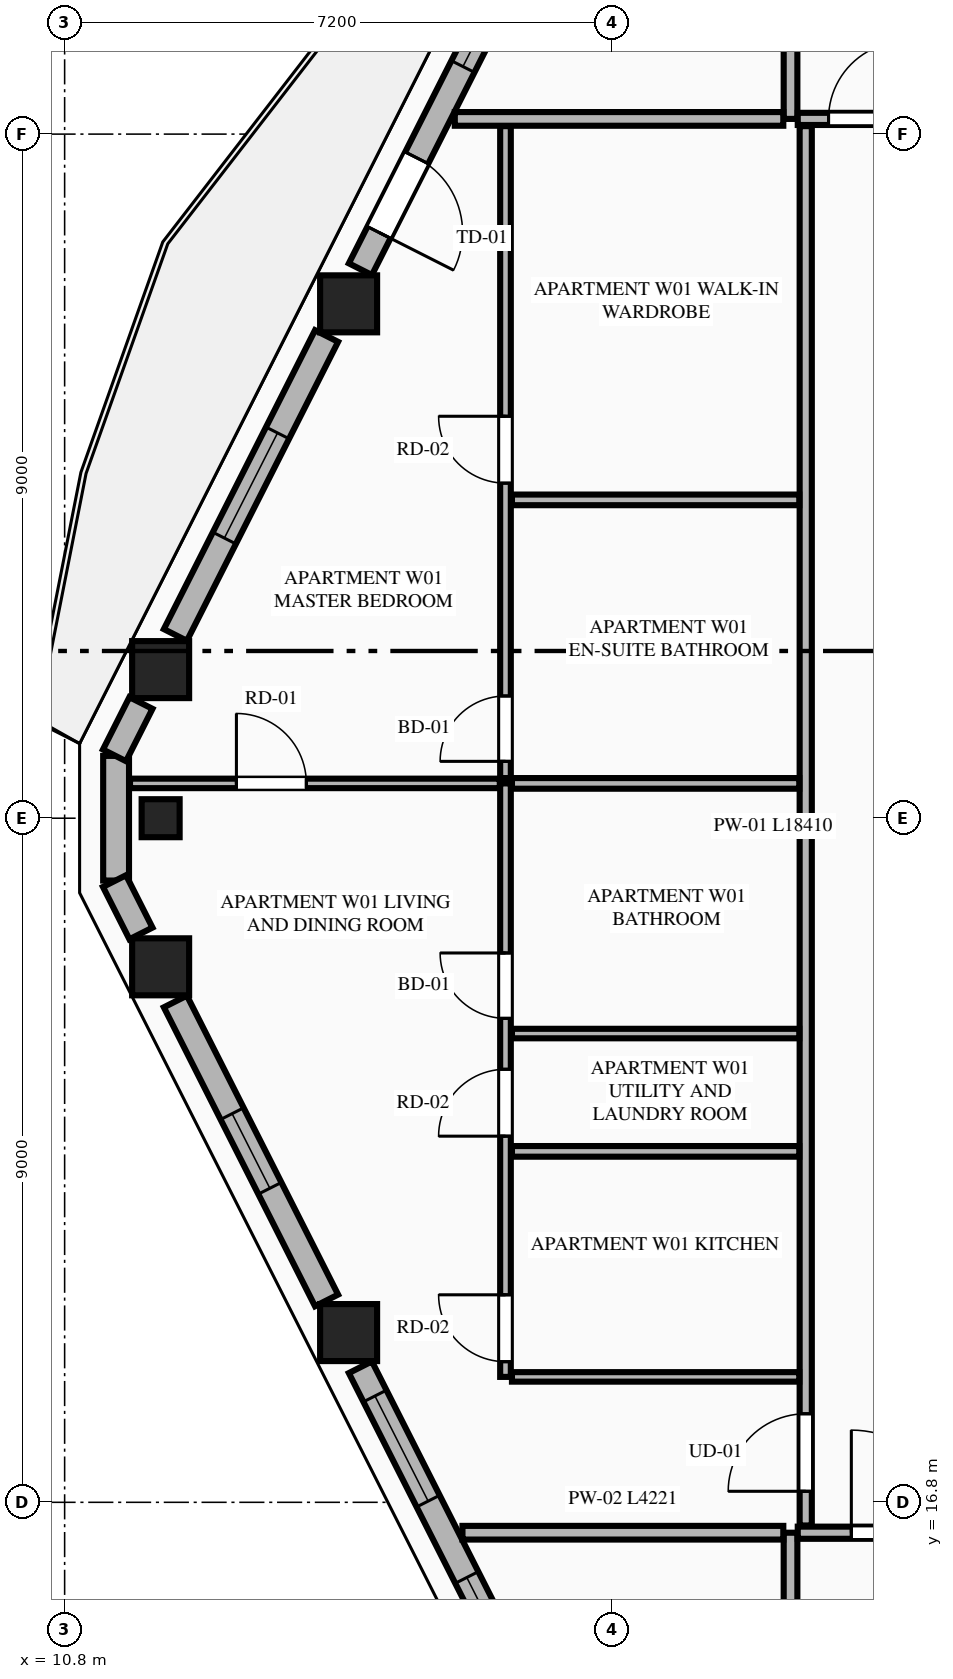
"""IFC4 building model, lengths in metres.
Left out: names, types, materials, properties, quantities, classifications, styles, units other than length and angle.
Written with IfcOpenShell. Run it as: python <this file> out.ifc"""

import sys

from ifc_helpers import new_model, si_unit, direction, frame, frame_2d, origin, origin_2d, place, context, subcontext, project, spatial, rectangle, extrude, element, fill, save


model = new_model("IFC4")
c1 = context("Model", 3, precision=1e-05, world=origin(), true_north=direction((0.0, 1.0)))
c2 = subcontext(c1, "Body", "Model", "MODEL_VIEW")
j1 = project(units=[si_unit("LENGTHUNIT", "METRE"), si_unit("PLANEANGLEUNIT", "RADIAN")], contexts=[c1])
p1 = place(None, origin())
s1 = spatial("IfcSite", under=j1, at=p1, CompositionType="ELEMENT")
p2 = place(p1, origin())
s2 = spatial("IfcBuilding", under=s1, at=p2, CompositionType="ELEMENT")
p3 = place(p2, frame((0.0, 0.0, 248.9)))
s3 = spatial("IfcBuildingStorey", under=s2, at=p3, CompositionType="ELEMENT", Elevation=248.9)
for number, where, z_axis, x_axis in (
    (1, (14.536, 32.567, 0.0), (0.0, 0.0, 1.0), (1.0, 0.0, 0.0)),
    (2, (12.063, 27.755, 0.0), (0.0, 0.0, 1.0), (1.0, 0.0, 0.0)),
    (3, (12.063, 23.845, 0.0), (0.0, 0.0, 1.0), (1.0, 0.0, 0.0)),
    (4, (14.536, 19.033, 0.0), (0.0, 0.0, 1.0), (1.0, 0.0, 0.0)),
):
    element("IfcColumn", number, at=place(p3, frame(where, z_axis=z_axis, x_axis=x_axis)), inside=s3, PredefinedType="COLUMN", context=c2, shape_type="SweptSolid", body=[
        extrude(rectangle(XDim=0.75, YDim=0.75, at=origin_2d()), origin(), (0.0, 0.0, 1.0), 3.65),
    ])
p4 = place(p3, frame((12.063, 25.8, 0.0), z_axis=(0.0, 0.0, 1.0), x_axis=(0.0, -1.0, 0.0)))
e5 = element("IfcColumn", 5, at=p4, inside=s3, PredefinedType="PILASTER", context=c2, shape_type="SweptSolid", body=[
    extrude(rectangle(XDim=0.5, YDim=0.35, at=origin_2d()), origin(), (0.0, 0.0, 1.0), 3.65),
])
p5 = place(p3, frame((11.477, 26.62, 0.0), z_axis=(0.0, 0.0, 1.0), x_axis=(0.0, -1.0, 0.0)))
e6 = element("IfcWall", 6, at=p5, inside=s3, PredefinedType="STANDARD", context=c2, shape_type="SweptSolid", body=[
    extrude(rectangle(XDim=1.64, YDim=0.34, at=frame_2d((0.82, 0.0))), origin(), (0.0, 0.0, 1.0), 3.45),
])
p6 = place(p3, frame((16.768, 37.127, 0.0), z_axis=(0.0, 0.0, 1.0), x_axis=(-0.451581819983, -0.892229712496, 0.0)))
e7 = element("IfcWall", 7, at=p6, inside=s3, PredefinedType="STANDARD", context=c2, shape_type="SweptSolid", body=[
    extrude(rectangle(XDim=4.6, YDim=0.34, at=frame_2d((2.3, 0.0))), origin(), (0.0, 0.0, 1.0), 2.983),
])
p7 = place(p6, frame((2.958, 0.0, 0.0)))
e8 = element("IfcOpeningElement", 8, at=p7, cuts=e7, PredefinedType="OPENING", context=c2, shape_type="SweptSolid", body=[
    extrude(rectangle(XDim=1.1, YDim=2.25, at=frame_2d((0.55, 1.125))), frame((0.0, 0.18, 0.0), z_axis=(0.0, -1.0, 0.0), x_axis=(1.0, 0.0, 0.0)), (0.0, 0.0, 1.0), 0.36),
])
p8 = place(p6, frame((0.512, 0.0, 0.75)))
e9 = element("IfcOpeningElement", 9, at=p8, cuts=e7, PredefinedType="OPENING", context=c2, shape_type="SweptSolid", body=[
    extrude(rectangle(XDim=1.1, YDim=2.0, at=frame_2d((0.55, 1.0))), frame((0.0, 0.18, 0.0), z_axis=(0.0, -1.0, 0.0), x_axis=(1.0, 0.0, 0.0)), (0.0, 0.0, 1.0), 0.36),
])
p9 = place(p3, frame((14.246, 32.144, 0.0), z_axis=(0.0, 0.0, 1.0), x_axis=(-0.451285866323, -0.892379441077, 0.0)))
e10 = element("IfcWall", 10, at=p9, inside=s3, PredefinedType="STANDARD", context=c2, shape_type="SweptSolid", body=[
    extrude(rectangle(XDim=4.407, YDim=0.34, at=frame_2d((2.204, 0.0))), origin(), (0.0, 0.0, 1.0), 2.983),
])
p10 = place(p9, frame((1.429, 0.0, 0.75)))
e11 = element("IfcOpeningElement", 11, at=p10, cuts=e10, PredefinedType="OPENING", context=c2, shape_type="SweptSolid", body=[
    extrude(rectangle(XDim=1.55, YDim=2.05, at=frame_2d((0.775, 1.025))), frame((0.0, 0.18, 0.0), z_axis=(0.0, -1.0, 0.0), x_axis=(1.0, 0.0, 0.0)), (0.0, 0.0, 1.0), 0.36),
])
for number, where, z_axis, x_axis in (
    (12, (11.804, 27.316, 0.0), (0.0, 0.0, 1.0), (-0.451, -0.893, 0.0)),
    (13, (11.456, 24.973, 0.0), (0.0, 0.0, 1.0), (0.451, -0.893, 0.0)),
):
    element("IfcWall", number, at=place(p3, frame(where, z_axis=z_axis, x_axis=x_axis)), inside=s3, PredefinedType="STANDARD", context=c2, shape_type="SweptSolid", body=[
        extrude(rectangle(XDim=0.772, YDim=0.34, at=frame_2d((0.386, 0.0))), origin(), (0.0, 0.0, 1.0), 3.45),
    ])
p11 = place(p3, frame((12.257, 23.389, 0.0), z_axis=(0.0, 0.0, 1.0), x_axis=(0.45130817501, -0.892368158984, 0.0)))
e14 = element("IfcWall", 14, at=p11, inside=s3, PredefinedType="STANDARD", context=c2, shape_type="SweptSolid", body=[
    extrude(rectangle(XDim=4.407, YDim=0.34, at=frame_2d((2.204, 0.0))), origin(), (0.0, 0.0, 1.0), 2.983),
])
p12 = place(p11, frame((1.654, 0.0, 0.75)))
e15 = element("IfcOpeningElement", 15, at=p12, cuts=e14, PredefinedType="OPENING", context=c2, shape_type="SweptSolid", body=[
    extrude(rectangle(XDim=1.1, YDim=2.0, at=frame_2d((0.55, 1.0))), frame((0.0, 0.18, 0.0), z_axis=(0.0, -1.0, 0.0), x_axis=(1.0, 0.0, 0.0)), (0.0, 0.0, 1.0), 0.36),
])
p13 = place(p3, frame((14.691, 18.577, 0.0), z_axis=(0.0, 0.0, 1.0), x_axis=(0.451581819983, -0.892229712496, 0.0)))
e16 = element("IfcWall", 16, at=p13, inside=s3, PredefinedType="STANDARD", context=c2, shape_type="SweptSolid", body=[
    extrude(rectangle(XDim=4.6, YDim=0.34, at=frame_2d((2.3, 0.0))), origin(), (0.0, 0.0, 1.0), 2.983),
])
p14 = place(p13, frame((0.424, 0.0, 0.75)))
e17 = element("IfcOpeningElement", 17, at=p14, cuts=e16, PredefinedType="OPENING", context=c2, shape_type="SweptSolid", body=[
    extrude(rectangle(XDim=1.55, YDim=2.05, at=frame_2d((0.775, 1.025))), frame((0.0, 0.18, 0.0), z_axis=(0.0, -1.0, 0.0), x_axis=(1.0, 0.0, 0.0)), (0.0, 0.0, 1.0), 0.36),
])
p15 = place(p13, frame((3.1, 0.0, 0.75)))
e18 = element("IfcOpeningElement", 18, at=p15, cuts=e16, PredefinedType="OPENING", context=c2, shape_type="SweptSolid", body=[
    extrude(rectangle(XDim=1.1, YDim=2.0, at=frame_2d((0.55, 1.0))), frame((0.0, 0.18, 0.0), z_axis=(0.0, -1.0, 0.0), x_axis=(1.0, 0.0, 0.0)), (0.0, 0.0, 1.0), 0.36),
])
p16 = place(p3, frame((20.35, 8.119, 0.0), z_axis=(0.0, 0.0, 1.0), x_axis=(0.0, 1.0, 0.0)))
e19 = element("IfcWall", 19, at=p16, inside=s3, PredefinedType="PARTITIONING", context=c2, shape_type="SweptSolid", body=[
    extrude(rectangle(XDim=8.281, YDim=0.18, at=frame_2d((4.141, 0.0))), origin(), (0.0, 0.0, 1.0), 3.45),
])
p17 = place(p3, frame((20.445, 16.4, 0.0), z_axis=(0.0, 0.0, 1.0), x_axis=(1.0, 0.0, 0.0)))
e20 = element("IfcWall", 20, at=p17, inside=s3, PredefinedType="PARTITIONING", context=c2, shape_type="SweptSolid", body=[
    extrude(rectangle(XDim=23.91, YDim=0.16, at=frame_2d((11.955, 0.0))), origin(), (0.0, 0.0, 1.0), 3.45),
])
p18 = place(p17, frame((0.705, 0.0, 0.0)))
e21 = element("IfcOpeningElement", 21, at=p18, cuts=e20, PredefinedType="OPENING", context=c2, shape_type="SweptSolid", body=[
    extrude(rectangle(XDim=1.35, YDim=2.35, at=frame_2d((0.675, 1.175))), frame((0.0, 0.09, 0.0), z_axis=(0.0, -1.0, 0.0), x_axis=(1.0, 0.0, 0.0)), (0.0, 0.0, 1.0), 0.18),
])
p19 = place(p3, frame((20.35, 35.0, 0.0), z_axis=(0.0, 0.0, 1.0), x_axis=(0.0, 1.0, 0.0)))
e22 = element("IfcWall", 22, at=p19, inside=s3, PredefinedType="PARTITIONING", context=c2, shape_type="SweptSolid", body=[
    extrude(rectangle(XDim=8.481, YDim=0.18, at=frame_2d((4.24, 0.0))), origin(), (0.0, 0.0, 1.0), 3.45),
])
p20 = place(p3, frame((20.445, 35.0, 0.0), z_axis=(0.0, 0.0, 1.0), x_axis=(1.0, 0.0, 0.0)))
e23 = element("IfcWall", 23, at=p20, inside=s3, PredefinedType="PARTITIONING", context=c2, shape_type="SweptSolid", body=[
    extrude(rectangle(XDim=8.606, YDim=0.16, at=frame_2d((4.303, 0.0))), origin(), (0.0, 0.0, 1.0), 3.45),
])
p21 = place(p20, frame((0.405, 0.0, 0.0)))
e24 = element("IfcOpeningElement", 24, at=p21, cuts=e23, PredefinedType="OPENING", context=c2, shape_type="SweptSolid", body=[
    extrude(rectangle(XDim=1.02, YDim=2.25, at=frame_2d((0.51, 1.125))), frame((0.0, 0.09, 0.0), z_axis=(0.0, -1.0, 0.0), x_axis=(1.0, 0.0, 0.0)), (0.0, 0.0, 1.0), 0.18),
])
p22 = place(p3, frame((16.034, 16.4, 0.0), z_axis=(0.0, 0.0, 1.0), x_axis=(1.0, 0.0, 0.0)))
e25 = element("IfcWall", 25, at=p22, inside=s3, PredefinedType="PARTITIONING", context=c2, shape_type="SweptSolid", body=[
    extrude(rectangle(XDim=4.221, YDim=0.18, at=frame_2d((2.11, 0.0))), origin(), (0.0, 0.0, 1.0), 3.45),
])
p23 = place(p3, frame((15.933, 35.0, 0.0), z_axis=(0.0, 0.0, 1.0), x_axis=(1.0, 0.0, 0.0)))
e26 = element("IfcWall", 26, at=p23, inside=s3, PredefinedType="PARTITIONING", context=c2, shape_type="SweptSolid", body=[
    extrude(rectangle(XDim=4.322, YDim=0.18, at=frame_2d((2.161, 0.0))), origin(), (0.0, 0.0, 1.0), 3.45),
])
p24 = place(p3, frame((20.55, 16.495, 0.0), z_axis=(0.0, 0.0, 1.0), x_axis=(0.0, 1.0, 0.0)))
e27 = element("IfcWall", 27, at=p24, inside=s3, PredefinedType="PARTITIONING", context=c2, shape_type="SweptSolid", body=[
    extrude(rectangle(XDim=18.41, YDim=0.16, at=frame_2d((9.205, 0.0))), origin(), (0.0, 0.0, 1.0), 3.137),
])
p25 = place(p24, frame((0.45, 0.0, 0.0)))
e28 = element("IfcOpeningElement", 28, at=p25, cuts=e27, PredefinedType="OPENING", context=c2, shape_type="SweptSolid", body=[
    extrude(rectangle(XDim=1.02, YDim=2.25, at=frame_2d((0.51, 1.125))), frame((0.0, 0.09, 0.0), z_axis=(0.0, -1.0, 0.0), x_axis=(1.0, 0.0, 0.0)), (0.0, 0.0, 1.0), 0.18),
])
p26 = place(p3, frame((16.685, 18.45, 0.0), z_axis=(0.0, 0.0, 1.0), x_axis=(1.0, 0.0, 0.0)))
e29 = element("IfcWall", 29, at=p26, inside=s3, PredefinedType="PARTITIONING", context=c2, shape_type="SweptSolid", body=[
    extrude(rectangle(XDim=3.78, YDim=0.125, at=frame_2d((1.89, 0.0))), origin(), (0.0, 0.0, 1.0), 3.45),
])
p27 = place(p3, frame((16.6, 18.45, 0.0), z_axis=(0.0, 0.0, 1.0), x_axis=(0.0, 1.0, 0.0)))
e30 = element("IfcWall", 30, at=p27, inside=s3, PredefinedType="PLUMBINGWALL", context=c2, shape_type="SweptSolid", body=[
    extrude(rectangle(XDim=7.808, YDim=0.14, at=frame_2d((3.904, 0.0))), origin(), (0.0, 0.0, 1.0), 3.45),
])
p28 = place(p27, frame((0.2, 0.0, 0.0)))
e31 = element("IfcOpeningElement", 31, at=p28, cuts=e30, PredefinedType="OPENING", context=c2, shape_type="SweptSolid", body=[
    extrude(rectangle(XDim=0.88, YDim=2.15, at=frame_2d((0.44, 1.075))), frame((0.0, 0.08, 0.0), z_axis=(0.0, -1.0, 0.0), x_axis=(1.0, 0.0, 0.0)), (0.0, 0.0, 1.0), 0.16),
])
p29 = place(p27, frame((3.167, 0.0, 0.0)))
e32 = element("IfcOpeningElement", 32, at=p29, cuts=e30, PredefinedType="OPENING", context=c2, shape_type="SweptSolid", body=[
    extrude(rectangle(XDim=0.88, YDim=2.15, at=frame_2d((0.44, 1.075))), frame((0.0, 0.08, 0.0), z_axis=(0.0, -1.0, 0.0), x_axis=(1.0, 0.0, 0.0)), (0.0, 0.0, 1.0), 0.16),
])
p30 = place(p27, frame((4.717, 0.0, 0.0)))
e33 = element("IfcOpeningElement", 33, at=p30, cuts=e30, PredefinedType="OPENING", context=c2, shape_type="SweptSolid", body=[
    extrude(rectangle(XDim=0.86, YDim=2.1, at=frame_2d((0.43, 1.05))), frame((0.0, 0.08, 0.0), z_axis=(0.0, -1.0, 0.0), x_axis=(1.0, 0.0, 0.0)), (0.0, 0.0, 1.0), 0.16),
])
p31 = place(p3, frame((16.6, 26.328, 0.0), z_axis=(0.0, 0.0, 1.0), x_axis=(0.0, 1.0, 0.0)))
e34 = element("IfcWall", 34, at=p31, inside=s3, PredefinedType="PLUMBINGWALL", context=c2, shape_type="SweptSolid", body=[
    extrude(rectangle(XDim=8.577, YDim=0.14, at=frame_2d((4.289, 0.0))), origin(), (0.0, 0.0, 1.0), 3.45),
])
p32 = place(p31, frame((0.22, 0.0, 0.0)))
e35 = element("IfcOpeningElement", 35, at=p32, cuts=e34, PredefinedType="OPENING", context=c2, shape_type="SweptSolid", body=[
    extrude(rectangle(XDim=0.86, YDim=2.1, at=frame_2d((0.43, 1.05))), frame((0.0, 0.08, 0.0), z_axis=(0.0, -1.0, 0.0), x_axis=(1.0, 0.0, 0.0)), (0.0, 0.0, 1.0), 0.16),
])
p33 = place(p31, frame((3.88, 0.0, 0.0)))
e36 = element("IfcOpeningElement", 36, at=p33, cuts=e34, PredefinedType="OPENING", context=c2, shape_type="SweptSolid", body=[
    extrude(rectangle(XDim=0.88, YDim=2.15, at=frame_2d((0.44, 1.075))), frame((0.0, 0.08, 0.0), z_axis=(0.0, -1.0, 0.0), x_axis=(1.0, 0.0, 0.0)), (0.0, 0.0, 1.0), 0.16),
])
p34 = place(p3, frame((16.685, 26.258, 0.0), z_axis=(0.0, 0.0, 1.0), x_axis=(1.0, 0.0, 0.0)))
e37 = element("IfcWall", 37, at=p34, inside=s3, PredefinedType="PLUMBINGWALL", context=c2, shape_type="SweptSolid", body=[
    extrude(rectangle(XDim=3.78, YDim=0.14, at=frame_2d((1.89, 0.0))), origin(), (0.0, 0.0, 1.0), 3.45),
])
p35 = place(p3, frame((11.66, 26.258, 0.0), z_axis=(0.0, 0.0, 1.0), x_axis=(1.0, 0.0, 0.0)))
e38 = element("IfcWall", 38, at=p35, inside=s3, PredefinedType="PARTITIONING", context=c2, shape_type="SweptSolid", body=[
    extrude(rectangle(XDim=4.865, YDim=0.125, at=frame_2d((2.433, 0.0))), origin(), (0.0, 0.0, 1.0), 3.45),
])
p36 = place(p35, frame((1.4, 0.0, 0.0)))
e39 = element("IfcOpeningElement", 39, at=p36, cuts=e38, PredefinedType="OPENING", context=c2, shape_type="SweptSolid", body=[
    extrude(rectangle(XDim=0.92, YDim=2.15, at=frame_2d((0.46, 1.075))), frame((0.0, 0.073, 0.0), z_axis=(0.0, -1.0, 0.0), x_axis=(1.0, 0.0, 0.0)), (0.0, 0.0, 1.0), 0.145),
])
p37 = place(p3, frame((16.685, 21.417, 0.0), z_axis=(0.0, 0.0, 1.0), x_axis=(1.0, 0.0, 0.0)))
e40 = element("IfcWall", 40, at=p37, inside=s3, PredefinedType="PLUMBINGWALL", context=c2, shape_type="SweptSolid", body=[
    extrude(rectangle(XDim=3.78, YDim=0.14, at=frame_2d((1.89, 0.0))), origin(), (0.0, 0.0, 1.0), 3.45),
])
p38 = place(p3, frame((16.685, 22.967, 0.0), z_axis=(0.0, 0.0, 1.0), x_axis=(1.0, 0.0, 0.0)))
e41 = element("IfcWall", 41, at=p38, inside=s3, PredefinedType="PARTITIONING", context=c2, shape_type="SweptSolid", body=[
    extrude(rectangle(XDim=3.78, YDim=0.125, at=frame_2d((1.89, 0.0))), origin(), (0.0, 0.0, 1.0), 3.45),
])
p39 = place(p3, frame((16.685, 29.988, 0.0), z_axis=(0.0, 0.0, 1.0), x_axis=(1.0, 0.0, 0.0)))
e42 = element("IfcWall", 42, at=p39, inside=s3, PredefinedType="PLUMBINGWALL", context=c2, shape_type="SweptSolid", body=[
    extrude(rectangle(XDim=3.78, YDim=0.14, at=frame_2d((1.89, 0.0))), origin(), (0.0, 0.0, 1.0), 3.45),
])
p40 = place(p7, origin())
e43 = element("IfcDoor", 43, at=p40, inside=s3, OperationType="SINGLE_SWING_RIGHT", PredefinedType="DOOR", context=c2, shape_type="SweptSolid", body=[
    extrude(rectangle(XDim=1.1, YDim=2.25, at=frame_2d((0.55, 1.125))), frame((0.0, 0.025, 0.0), z_axis=(0.0, -1.0, 0.0), x_axis=(1.0, 0.0, 0.0)), (0.0, 0.0, 1.0), 0.05),
])
fill(e8, e43)
p41 = place(p10, origin())
e44 = element("IfcWindow", 44, at=p41, inside=s3, PartitioningType="SINGLE_PANEL", PredefinedType="WINDOW", context=c2, shape_type="SweptSolid", body=[
    extrude(rectangle(XDim=1.55, YDim=2.05, at=frame_2d((0.775, 1.025))), frame((0.0, 0.03, 0.0), z_axis=(0.0, -1.0, 0.0), x_axis=(1.0, 0.0, 0.0)), (0.0, 0.0, 1.0), 0.06),
])
fill(e11, e44)
p42 = place(p12, origin())
e45 = element("IfcWindow", 45, at=p42, inside=s3, PartitioningType="SINGLE_PANEL", PredefinedType="WINDOW", context=c2, shape_type="SweptSolid", body=[
    extrude(rectangle(XDim=1.1, YDim=2.0, at=frame_2d((0.55, 1.0))), frame((0.0, 0.03, 0.0), z_axis=(0.0, -1.0, 0.0), x_axis=(1.0, 0.0, 0.0)), (0.0, 0.0, 1.0), 0.06),
])
fill(e15, e45)
p43 = place(p14, origin())
e46 = element("IfcWindow", 46, at=p43, inside=s3, PartitioningType="SINGLE_PANEL", PredefinedType="WINDOW", context=c2, shape_type="SweptSolid", body=[
    extrude(rectangle(XDim=1.55, YDim=2.05, at=frame_2d((0.775, 1.025))), frame((0.0, 0.03, 0.0), z_axis=(0.0, -1.0, 0.0), x_axis=(1.0, 0.0, 0.0)), (0.0, 0.0, 1.0), 0.06),
])
fill(e17, e46)
p44 = place(p18, origin())
e47 = element("IfcDoor", 47, at=p44, inside=s3, OperationType="SINGLE_SWING_LEFT", PredefinedType="DOOR", context=c2, shape_type="SweptSolid", body=[
    extrude(rectangle(XDim=1.35, YDim=2.35, at=frame_2d((0.675, 1.175))), frame((0.0, 0.025, 0.0), z_axis=(0.0, -1.0, 0.0), x_axis=(1.0, 0.0, 0.0)), (0.0, 0.0, 1.0), 0.05),
])
fill(e21, e47)
p45 = place(p21, origin())
e48 = element("IfcDoor", 48, at=p45, inside=s3, OperationType="SINGLE_SWING_RIGHT", PredefinedType="DOOR", context=c2, shape_type="SweptSolid", body=[
    extrude(rectangle(XDim=1.02, YDim=2.25, at=frame_2d((0.51, 1.125))), frame((0.0, 0.025, 0.0), z_axis=(0.0, -1.0, 0.0), x_axis=(1.0, 0.0, 0.0)), (0.0, 0.0, 1.0), 0.05),
])
fill(e24, e48)
p46 = place(p28, origin())
e49 = element("IfcDoor", 49, at=p46, inside=s3, OperationType="SINGLE_SWING_RIGHT", PredefinedType="DOOR", context=c2, shape_type="SweptSolid", body=[
    extrude(rectangle(XDim=0.88, YDim=2.15, at=frame_2d((0.44, 1.075))), frame((0.0, 0.025, 0.0), z_axis=(0.0, -1.0, 0.0), x_axis=(1.0, 0.0, 0.0)), (0.0, 0.0, 1.0), 0.05),
])
fill(e31, e49)
p47 = place(p29, origin())
e50 = element("IfcDoor", 50, at=p47, inside=s3, OperationType="SINGLE_SWING_LEFT", PredefinedType="DOOR", context=c2, shape_type="SweptSolid", body=[
    extrude(rectangle(XDim=0.88, YDim=2.15, at=frame_2d((0.44, 1.075))), frame((0.0, 0.025, 0.0), z_axis=(0.0, -1.0, 0.0), x_axis=(1.0, 0.0, 0.0)), (0.0, 0.0, 1.0), 0.05),
])
fill(e32, e50)
p48 = place(p30, origin())
e51 = element("IfcDoor", 51, at=p48, inside=s3, OperationType="SINGLE_SWING_RIGHT", PredefinedType="DOOR", context=c2, shape_type="SweptSolid", body=[
    extrude(rectangle(XDim=0.86, YDim=2.1, at=frame_2d((0.43, 1.05))), frame((0.0, 0.025, 0.0), z_axis=(0.0, -1.0, 0.0), x_axis=(1.0, 0.0, 0.0)), (0.0, 0.0, 1.0), 0.05),
])
fill(e33, e51)
p49 = place(p32, origin())
e52 = element("IfcDoor", 52, at=p49, inside=s3, OperationType="SINGLE_SWING_LEFT", PredefinedType="DOOR", context=c2, shape_type="SweptSolid", body=[
    extrude(rectangle(XDim=0.86, YDim=2.1, at=frame_2d((0.43, 1.05))), frame((0.0, 0.025, 0.0), z_axis=(0.0, -1.0, 0.0), x_axis=(1.0, 0.0, 0.0)), (0.0, 0.0, 1.0), 0.05),
])
fill(e35, e52)
p50 = place(p33, origin())
e53 = element("IfcDoor", 53, at=p50, inside=s3, OperationType="SINGLE_SWING_RIGHT", PredefinedType="DOOR", context=c2, shape_type="SweptSolid", body=[
    extrude(rectangle(XDim=0.88, YDim=2.15, at=frame_2d((0.44, 1.075))), frame((0.0, 0.025, 0.0), z_axis=(0.0, -1.0, 0.0), x_axis=(1.0, 0.0, 0.0)), (0.0, 0.0, 1.0), 0.05),
])
fill(e36, e53)
p51 = place(p25, origin())
e54 = element("IfcDoor", 54, at=p51, inside=s3, OperationType="SINGLE_SWING_LEFT", PredefinedType="DOOR", context=c2, shape_type="SweptSolid", body=[
    extrude(rectangle(XDim=1.02, YDim=2.25, at=frame_2d((0.51, 1.125))), frame((0.0, 0.025, 0.0), z_axis=(0.0, -1.0, 0.0), x_axis=(1.0, 0.0, 0.0)), (0.0, 0.0, 1.0), 0.05),
])
fill(e28, e54)
p52 = place(p36, origin())
e55 = element("IfcDoor", 55, at=p52, inside=s3, OperationType="SINGLE_SWING_LEFT", PredefinedType="DOOR", context=c2, shape_type="SweptSolid", body=[
    extrude(rectangle(XDim=0.92, YDim=2.15, at=frame_2d((0.46, 1.075))), frame((0.0, 0.025, 0.0), z_axis=(0.0, -1.0, 0.0), x_axis=(1.0, 0.0, 0.0)), (0.0, 0.0, 1.0), 0.05),
])
fill(e39, e55)
p53 = place(p8, origin())
e56 = element("IfcWindow", 56, at=p53, inside=s3, PartitioningType="SINGLE_PANEL", PredefinedType="WINDOW", context=c2, shape_type="SweptSolid", body=[
    extrude(rectangle(XDim=1.1, YDim=2.0, at=frame_2d((0.55, 1.0))), frame((0.0, 0.03, 0.0), z_axis=(0.0, -1.0, 0.0), x_axis=(1.0, 0.0, 0.0)), (0.0, 0.0, 1.0), 0.06),
])
fill(e9, e56)
p54 = place(p15, origin())
e57 = element("IfcWindow", 57, at=p54, inside=s3, PartitioningType="SINGLE_PANEL", PredefinedType="WINDOW", context=c2, shape_type="SweptSolid", body=[
    extrude(rectangle(XDim=1.1, YDim=2.0, at=frame_2d((0.55, 1.0))), frame((0.0, 0.03, 0.0), z_axis=(0.0, -1.0, 0.0), x_axis=(1.0, 0.0, 0.0)), (0.0, 0.0, 1.0), 0.06),
])
fill(e18, e57)
save(model, sys.argv[1])
